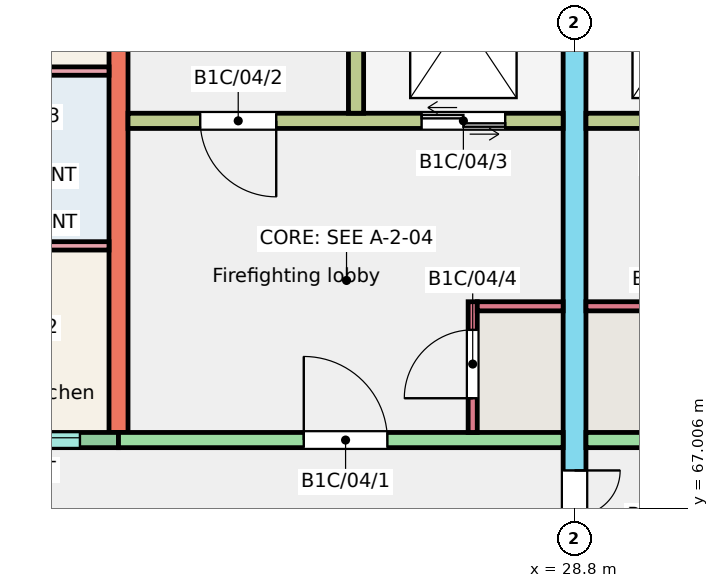
"""IFC4 building model, lengths in metres.
Left out: names, types, materials, properties, quantities, classifications, styles, units other than length and angle.
Written with IfcOpenShell. Run it as: python <this file> out.ifc"""

import sys

from ifc_helpers import new_model, si_unit, direction, frame, frame_2d, origin, place, context, subcontext, project, spatial, rectangle, extrude, element, fill, save


model = new_model("IFC4")
c1 = context("Model", 3, precision=1e-05, world=origin(), true_north=direction((0.0, 1.0)))
c2 = subcontext(c1, "Body", "Model", "MODEL_VIEW")
j1 = project(units=[si_unit("LENGTHUNIT", "METRE"), si_unit("PLANEANGLEUNIT", "RADIAN")], contexts=[c1])
p1 = place(None, origin())
s1 = spatial("IfcSite", under=j1, at=p1, CompositionType="ELEMENT")
p2 = place(p1, origin())
s2 = spatial("IfcBuilding", under=s1, at=p2, CompositionType="ELEMENT")
p3 = place(p2, frame((0.0, 0.0, 12.0)))
s3 = spatial("IfcBuildingStorey", under=s2, at=p3, CompositionType="ELEMENT", Elevation=12.0)
p4 = place(p3, frame((22.8, 68.0, 0.0), z_axis=(0.0, 0.0, 1.0), x_axis=(0.0, 1.0, 0.0)))
e1 = element("IfcWall", 1, at=p4, inside=s3, PredefinedType="SHEAR", context=c2, shape_type="SweptSolid", body=[
    extrude(rectangle(XDim=9.0, YDim=0.25, at=frame_2d((4.5, 0.0))), origin(), (0.0, 0.0, 1.0), 3.0),
])
p5 = place(p3, frame((28.8, 66.0, 0.0), z_axis=(0.0, 0.0, 1.0), x_axis=(0.0, 1.0, 0.0)))
e2 = element("IfcWall", 2, at=p5, inside=s3, PredefinedType="SHEAR", context=c2, shape_type="SweptSolid", body=[
    extrude(rectangle(XDim=11.0, YDim=0.3, at=frame_2d((5.5, 0.0))), origin(), (0.0, 0.0, 1.0), 3.0),
])
p6 = place(p5, frame((0.3, 0.0, 0.0)))
e3 = element("IfcOpeningElement", 3, at=p6, cuts=e2, PredefinedType="OPENING", context=c2, shape_type="SweptSolid", body=[
    extrude(rectangle(XDim=1.2, YDim=2.1, at=frame_2d((0.6, 1.05))), frame((0.0, 0.16, 0.0), z_axis=(0.0, -1.0, 0.0), x_axis=(1.0, 0.0, 0.0)), (0.0, 0.0, 1.0), 0.32),
])
p7 = place(p3, frame((19.2, 67.9, 0.0), z_axis=(0.0, 0.0, 1.0), x_axis=(1.0, 0.0, 0.0)))
e4 = element("IfcWall", 4, at=p7, inside=s3, PredefinedType="SOLIDWALL", context=c2, shape_type="SweptSolid", body=[
    extrude(rectangle(XDim=3.6, YDim=0.2, at=frame_2d((1.8, 0.0))), origin(), (0.0, 0.0, 1.0), 3.0),
])
p8 = place(p7, frame((1.893, 0.0, 1.1)))
e5 = element("IfcOpeningElement", 5, at=p8, cuts=e4, PredefinedType="OPENING", context=c2, shape_type="SweptSolid", body=[
    extrude(rectangle(XDim=1.2, YDim=1.3, at=frame_2d((0.6, 0.65))), frame((0.0, 0.11, 0.0), z_axis=(0.0, -1.0, 0.0), x_axis=(1.0, 0.0, 0.0)), (0.0, 0.0, 1.0), 0.22),
])
p9 = place(p7, frame((0.25, 0.0, 0.0)))
e6 = element("IfcOpeningElement", 6, at=p9, cuts=e4, PredefinedType="OPENING", context=c2, shape_type="SweptSolid", body=[
    extrude(rectangle(XDim=1.0, YDim=2.1, at=frame_2d((0.5, 1.05))), frame((0.0, 0.11, 0.0), z_axis=(0.0, -1.0, 0.0), x_axis=(1.0, 0.0, 0.0)), (0.0, 0.0, 1.0), 0.22),
])
p10 = place(p3, frame((22.8, 67.9, 0.0), z_axis=(0.0, 0.0, 1.0), x_axis=(1.0, 0.0, 0.0)))
e7 = element("IfcWall", 7, at=p10, inside=s3, PredefinedType="SHEAR", context=c2, shape_type="SweptSolid", body=[
    extrude(rectangle(XDim=5.85, YDim=0.2, at=frame_2d((2.925, 0.0))), origin(), (0.0, 0.0, 1.0), 3.0),
])
p11 = place(p10, frame((2.438, 0.0, 0.0)))
e8 = element("IfcOpeningElement", 8, at=p11, cuts=e7, PredefinedType="OPENING", context=c2, shape_type="SweptSolid", body=[
    extrude(rectangle(XDim=1.1, YDim=2.1, at=frame_2d((0.55, 1.05))), frame((0.0, 0.11, 0.0), z_axis=(0.0, -1.0, 0.0), x_axis=(1.0, 0.0, 0.0)), (0.0, 0.0, 1.0), 0.22),
])
p12 = place(p3, frame((22.925, 72.1, 0.0), z_axis=(0.0, 0.0, 1.0), x_axis=(1.0, 0.0, 0.0)))
e9 = element("IfcWall", 9, at=p12, inside=s3, PredefinedType="SHEAR", context=c2, shape_type="SweptSolid", body=[
    extrude(rectangle(XDim=5.725, YDim=0.2, at=frame_2d((2.862, 0.0))), origin(), (0.0, 0.0, 1.0), 3.0),
])
p13 = place(p12, frame((0.95, 0.0, 0.0)))
e10 = element("IfcOpeningElement", 10, at=p13, cuts=e9, PredefinedType="OPENING", context=c2, shape_type="SweptSolid", body=[
    extrude(rectangle(XDim=1.0, YDim=2.1, at=frame_2d((0.5, 1.05))), frame((0.0, 0.11, 0.0), z_axis=(0.0, -1.0, 0.0), x_axis=(1.0, 0.0, 0.0)), (0.0, 0.0, 1.0), 0.22),
])
p14 = place(p12, frame((3.863, 0.0, 0.0)))
e11 = element("IfcOpeningElement", 11, at=p14, cuts=e9, PredefinedType="OPENING", context=c2, shape_type="SweptSolid", body=[
    extrude(rectangle(XDim=1.1, YDim=2.1, at=frame_2d((0.55, 1.05))), frame((0.0, 0.11, 0.0), z_axis=(0.0, -1.0, 0.0), x_axis=(1.0, 0.0, 0.0)), (0.0, 0.0, 1.0), 0.22),
])
p15 = place(p3, frame((25.925, 72.2, 0.0), z_axis=(0.0, 0.0, 1.0), x_axis=(0.0, 1.0, 0.0)))
e12 = element("IfcWall", 12, at=p15, inside=s3, PredefinedType="SHEAR", context=c2, shape_type="SweptSolid", body=[
    extrude(rectangle(XDim=4.8, YDim=0.2, at=frame_2d((2.4, 0.0))), origin(), (0.0, 0.0, 1.0), 3.0),
])
p16 = place(p3, frame((27.46, 68.0, 0.0), z_axis=(0.0, 0.0, 1.0), x_axis=(0.0, 1.0, 0.0)))
e13 = element("IfcWall", 13, at=p16, inside=s3, PredefinedType="SHEAR", context=c2, shape_type="SweptSolid", body=[
    extrude(rectangle(XDim=1.72, YDim=0.12, at=frame_2d((0.86, 0.0))), origin(), (0.0, 0.0, 1.0), 3.0),
])
p17 = place(p16, frame((0.45, 0.0, 0.0)))
e14 = element("IfcOpeningElement", 14, at=p17, cuts=e13, PredefinedType="OPENING", context=c2, shape_type="SweptSolid", body=[
    extrude(rectangle(XDim=0.9, YDim=2.1, at=frame_2d((0.45, 1.05))), frame((0.0, 0.07, 0.0), z_axis=(0.0, -1.0, 0.0), x_axis=(1.0, 0.0, 0.0)), (0.0, 0.0, 1.0), 0.14),
])
p18 = place(p3, frame((27.52, 69.66, 0.0), z_axis=(0.0, 0.0, 1.0), x_axis=(1.0, 0.0, 0.0)))
e15 = element("IfcWall", 15, at=p18, inside=s3, PredefinedType="SHEAR", context=c2, shape_type="SweptSolid", body=[
    extrude(rectangle(XDim=1.13, YDim=0.12, at=frame_2d((0.565, 0.0))), origin(), (0.0, 0.0, 1.0), 3.0),
])
p19 = place(p3, frame((28.95, 67.9, 0.0), z_axis=(0.0, 0.0, 1.0), x_axis=(1.0, 0.0, 0.0)))
e16 = element("IfcWall", 16, at=p19, inside=s3, PredefinedType="SHEAR", context=c2, shape_type="SweptSolid", body=[
    extrude(rectangle(XDim=5.85, YDim=0.2, at=frame_2d((2.925, 0.0))), origin(), (0.0, 0.0, 1.0), 3.0),
])
p20 = place(p19, frame((2.312, 0.0, 0.0)))
e17 = element("IfcOpeningElement", 17, at=p20, cuts=e16, PredefinedType="OPENING", context=c2, shape_type="SweptSolid", body=[
    extrude(rectangle(XDim=1.1, YDim=2.1, at=frame_2d((0.55, 1.05))), frame((0.0, 0.11, 0.0), z_axis=(0.0, -1.0, 0.0), x_axis=(1.0, 0.0, 0.0)), (0.0, 0.0, 1.0), 0.22),
])
p21 = place(p3, frame((28.95, 72.1, 0.0), z_axis=(0.0, 0.0, 1.0), x_axis=(1.0, 0.0, 0.0)))
e18 = element("IfcWall", 18, at=p21, inside=s3, PredefinedType="SHEAR", context=c2, shape_type="SweptSolid", body=[
    extrude(rectangle(XDim=5.725, YDim=0.2, at=frame_2d((2.863, 0.0))), origin(), (0.0, 0.0, 1.0), 3.0),
])
p22 = place(p21, frame((3.775, 0.0, 0.0)))
e19 = element("IfcOpeningElement", 19, at=p22, cuts=e18, PredefinedType="OPENING", context=c2, shape_type="SweptSolid", body=[
    extrude(rectangle(XDim=1.0, YDim=2.1, at=frame_2d((0.5, 1.05))), frame((0.0, 0.11, 0.0), z_axis=(0.0, -1.0, 0.0), x_axis=(1.0, 0.0, 0.0)), (0.0, 0.0, 1.0), 0.22),
])
p23 = place(p21, frame((0.762, 0.0, 0.0)))
e20 = element("IfcOpeningElement", 20, at=p23, cuts=e18, PredefinedType="OPENING", context=c2, shape_type="SweptSolid", body=[
    extrude(rectangle(XDim=1.1, YDim=2.1, at=frame_2d((0.55, 1.05))), frame((0.0, 0.11, 0.0), z_axis=(0.0, -1.0, 0.0), x_axis=(1.0, 0.0, 0.0)), (0.0, 0.0, 1.0), 0.22),
])
p24 = place(p3, frame((28.95, 69.66, 0.0), z_axis=(0.0, 0.0, 1.0), x_axis=(1.0, 0.0, 0.0)))
e21 = element("IfcWall", 21, at=p24, inside=s3, PredefinedType="SHEAR", context=c2, shape_type="SweptSolid", body=[
    extrude(rectangle(XDim=1.13, YDim=0.12, at=frame_2d((0.565, 0.0))), origin(), (0.0, 0.0, 1.0), 3.0),
])
p25 = place(p3, frame((20.71, 70.455, 0.0), z_axis=(0.0, 0.0, 1.0), x_axis=(1.0, 0.0, 0.0)))
e22 = element("IfcWall", 22, at=p25, inside=s3, PredefinedType="PARTITIONING", context=c2, shape_type="SweptSolid", body=[
    extrude(rectangle(XDim=1.965, YDim=0.11, at=frame_2d((0.982, 0.0))), origin(), (0.0, 0.0, 1.0), 2.8),
])
p26 = place(p3, frame((19.3, 72.755, 0.0), z_axis=(0.0, 0.0, 1.0), x_axis=(1.0, 0.0, 0.0)))
e23 = element("IfcWall", 23, at=p26, inside=s3, PredefinedType="PARTITIONING", context=c2, shape_type="SweptSolid", body=[
    extrude(rectangle(XDim=3.375, YDim=0.11, at=frame_2d((1.688, 0.0))), origin(), (0.0, 0.0, 1.0), 2.8),
])
p27 = place(p26, frame((0.2, 0.0, 0.0)))
e24 = element("IfcOpeningElement", 24, at=p27, cuts=e23, PredefinedType="OPENING", context=c2, shape_type="SweptSolid", body=[
    extrude(rectangle(XDim=0.9, YDim=2.1, at=frame_2d((0.45, 1.05))), frame((0.0, 0.065, 0.0), z_axis=(0.0, -1.0, 0.0), x_axis=(1.0, 0.0, 0.0)), (0.0, 0.0, 1.0), 0.13),
])
p28 = place(p8, origin())
e25 = element("IfcWindow", 25, at=p28, inside=s3, PartitioningType="SINGLE_PANEL", PredefinedType="WINDOW", context=c2, shape_type="SweptSolid", body=[
    extrude(rectangle(XDim=1.2, YDim=1.3, at=frame_2d((0.6, 0.65))), frame((0.0, 0.06, 0.0), z_axis=(0.0, -1.0, 0.0), x_axis=(1.0, 0.0, 0.0)), (0.0, 0.0, 1.0), 0.06),
])
fill(e5, e25)
p29 = place(p11, origin())
e26 = element("IfcDoor", 26, at=p29, inside=s3, OperationType="SINGLE_SWING_LEFT", PredefinedType="DOOR", context=c2, shape_type="SweptSolid", body=[
    extrude(rectangle(XDim=1.1, YDim=2.1, at=frame_2d((0.55, 1.05))), frame((0.0, 0.025, 0.0), z_axis=(0.0, -1.0, 0.0), x_axis=(1.0, 0.0, 0.0)), (0.0, 0.0, 1.0), 0.05),
])
fill(e8, e26)
p30 = place(p13, origin())
e27 = element("IfcDoor", 27, at=p30, inside=s3, OperationType="SINGLE_SWING_RIGHT", PredefinedType="DOOR", context=c2, shape_type="SweptSolid", body=[
    extrude(rectangle(XDim=1.0, YDim=2.1, at=frame_2d((0.5, 1.05))), frame((0.0, 0.025, 0.0), z_axis=(0.0, -1.0, 0.0), x_axis=(1.0, 0.0, 0.0)), (0.0, 0.0, 1.0), 0.05),
])
fill(e10, e27)
p31 = place(p14, origin())
e28 = element("IfcDoor", 28, at=p31, inside=s3, OperationType="DOUBLE_DOOR_SLIDING", PredefinedType="DOOR", context=c2, shape_type="SweptSolid", body=[
    extrude(rectangle(XDim=1.1, YDim=2.1, at=frame_2d((0.55, 1.05))), frame((0.0, 0.025, 0.0), z_axis=(0.0, -1.0, 0.0), x_axis=(1.0, 0.0, 0.0)), (0.0, 0.0, 1.0), 0.05),
])
fill(e11, e28)
p32 = place(p17, origin())
e29 = element("IfcDoor", 29, at=p32, inside=s3, OperationType="SINGLE_SWING_LEFT", PredefinedType="DOOR", context=c2, shape_type="SweptSolid", body=[
    extrude(rectangle(XDim=0.9, YDim=2.1, at=frame_2d((0.45, 1.05))), frame((0.0, 0.025, 0.0), z_axis=(0.0, -1.0, 0.0), x_axis=(1.0, 0.0, 0.0)), (0.0, 0.0, 1.0), 0.05),
])
fill(e14, e29)
p33 = place(p6, origin())
e30 = element("IfcDoor", 30, at=p33, inside=s3, OperationType="DOUBLE_DOOR_SINGLE_SWING", PredefinedType="DOOR", context=c2, shape_type="SweptSolid", body=[
    extrude(rectangle(XDim=1.2, YDim=2.1, at=frame_2d((0.6, 1.05))), frame((0.0, 0.025, 0.0), z_axis=(0.0, -1.0, 0.0), x_axis=(1.0, 0.0, 0.0)), (0.0, 0.0, 1.0), 0.05),
])
fill(e3, e30)
save(model, sys.argv[1])
